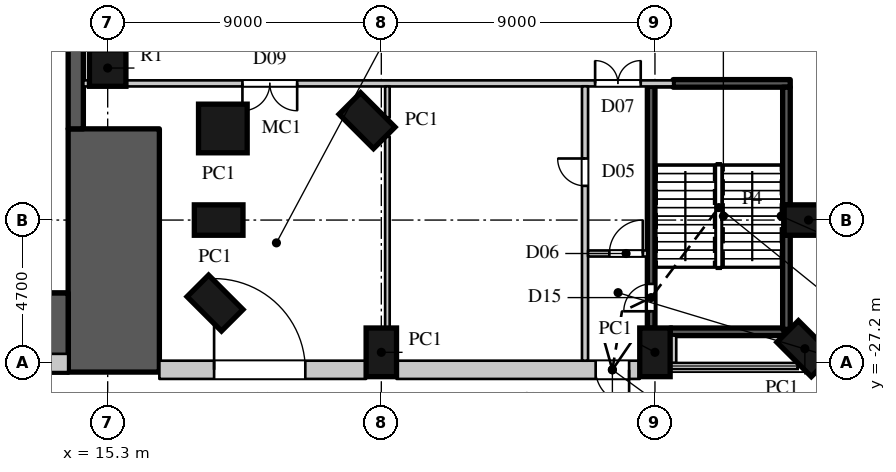
"""IFC4 building model, lengths in metres.
Left out: names, types, materials, properties, quantities, classifications, styles, units other than length and angle.
Written with IfcOpenShell. Run it as: python <this file> out.ifc"""

import sys

from ifc_helpers import new_model, si_unit, direction, frame, frame_2d, origin, origin_2d, place, context, subcontext, project, spatial, polyline, rectangle, circle, outline, extrude, element, fill, save


model = new_model("IFC4")
c1 = context("Model", 3, precision=1e-05, world=origin(), true_north=direction((0.0, 1.0)))
c2 = subcontext(c1, "Body", "Model", "MODEL_VIEW")
j1 = project(units=[si_unit("LENGTHUNIT", "METRE"), si_unit("PLANEANGLEUNIT", "RADIAN")], contexts=[c1])
p1 = place(None, origin())
s1 = spatial("IfcSite", under=j1, at=p1, CompositionType="ELEMENT")
p2 = place(p1, origin())
s2 = spatial("IfcBuilding", under=s1, at=p2, CompositionType="ELEMENT")
p3 = place(p2, origin())
s3 = spatial("IfcBuildingStorey", under=s2, at=p3, CompositionType="ELEMENT", Elevation=0.0)
p4 = place(p3, frame((15.5, -27.5, 0.0), z_axis=(0.0, 0.0, 1.0), x_axis=(0.0, 1.0, 0.0)))
e1 = element("IfcWall", 1, at=p4, inside=s3, PredefinedType="SOLIDWALL", context=c2, shape_type="SweptSolid", body=[
    extrude(rectangle(XDim=8.0, YDim=3.0, at=frame_2d((4.0, 0.0))), origin(), (0.0, 0.0, 1.0), 9.0),
])
p5 = place(p3, frame((14.25, -19.5, 0.0), z_axis=(0.0, 0.0, 1.0), x_axis=(0.0, 1.0, 0.0)))
e2 = element("IfcWall", 2, at=p5, inside=s3, PredefinedType="SOLIDWALL", context=c2, shape_type="SweptSolid", body=[
    extrude(rectangle(XDim=39.0, YDim=0.5, at=frame_2d((19.5, 0.0))), origin(), (0.0, 0.0, 1.0), 9.0),
])
p6 = place(p3, frame((-10.0, -27.2, 0.0), z_axis=(0.0, 0.0, 1.0), x_axis=(1.0, 0.0, 0.0)))
e3 = element("IfcWall", 3, at=p6, inside=s3, PredefinedType="SOLIDWALL", context=c2, shape_type="SweptSolid", body=[
    extrude(outline(polyline([(24.0, 11.553), (18.661, 23.543), (15.919, 22.326), (18.264, 24.131), (17.882, 24.696), (17.248, 25.422), (16.575, 26.079), (16.345, 26.278), (15.85, 26.664), (15.061, 27.167), (14.198, 27.573), (13.259, 27.854), (12.757, 27.94), (12.262, 27.983), (11.738, 27.983), (11.243, 27.94), (10.741, 27.854), (9.802, 27.573), (8.939, 27.167), (8.15, 26.664), (7.655, 26.278), (7.425, 26.079), (6.752, 25.422), (6.118, 24.696), (5.736, 24.131), (8.081, 22.326), (5.339, 23.543), (0.0, 11.553), (0.0, 28.6), (24.0, 28.6), (24.0, 11.553)])), frame((0.0, 0.3, 0.0), z_axis=(0.0, -1.0, 0.0), x_axis=(1.0, 0.0, 0.0)), (0.0, 0.0, 1.0), 0.6),
])
p7 = place(p3, frame((-10.0, -26.2, 0.0), z_axis=(0.0, 0.0, 1.0), x_axis=(1.0, 0.0, 0.0)))
e4 = element("IfcWall", 4, at=p7, inside=s3, PredefinedType="SOLIDWALL", context=c2, shape_type="SweptSolid", body=[
    extrude(outline(polyline([(24.0, 0.0), (23.5, 2.04), (23.0, 3.993), (22.5, 5.859), (22.0, 7.639), (21.5, 9.332), (21.023, 10.865), (21.26, 10.333), (24.0, 11.553), (24.0, 0.0)])), frame((0.0, 1.3, 0.0), z_axis=(0.0, -1.0, 0.0), x_axis=(1.0, 0.0, 0.0)), (0.0, 0.0, 1.0), 2.6),
])
for number, where, z_axis, x_axis in (
    (5, (18.831, -25.231, 0.0), (0.0, 0.0, 1.0), (0.707, 0.707, 0.0)),
    (6, (18.95, -22.5, 0.0), (0.0, 0.0, 1.0), (0.0, 1.0, 0.0)),
):
    element("IfcColumn", number, at=place(p3, frame(where, z_axis=z_axis, x_axis=x_axis)), inside=s3, PredefinedType="COLUMN", context=c2, shape_type="SweptSolid", body=[
        extrude(rectangle(XDim=1.0, YDim=1.6, at=origin_2d()), origin(), (0.0, 0.0, 1.0), 9.0),
    ])
p8 = place(p3, frame((19.088, -19.488, 0.0), z_axis=(0.0, 0.0, 1.0), x_axis=(1.0, 0.0, 0.0)))
e7 = element("IfcColumn", 7, at=p8, inside=s3, PredefinedType="COLUMN", context=c2, shape_type="SweptSolid", body=[
    extrude(circle(Radius=0.8, at=origin_2d()), origin(), (0.0, 0.0, 1.0), 9.0),
])
for number, where, z_axis, x_axis in (
    (8, (23.831, -19.231, 0.0), (0.0, 0.0, 1.0), (0.707, 0.707, 0.0)),
    (9, (24.3, -26.85, 0.0), (0.0, 0.0, 1.0), (1.0, 0.0, 0.0)),
    (10, (33.3, -26.85, 0.0), (0.0, 0.0, 1.0), (1.0, 0.0, 0.0)),
    (11, (38.231, -26.731, 0.0), (0.0, 0.0, 1.0), (0.707, 0.707, 0.0)),
    (12, (38.35, -22.5, 0.0), (0.0, 0.0, 1.0), (0.0, 1.0, 0.0)),
):
    element("IfcColumn", number, at=place(p3, frame(where, z_axis=z_axis, x_axis=x_axis)), inside=s3, PredefinedType="COLUMN", context=c2, shape_type="SweptSolid", body=[
        extrude(rectangle(XDim=1.0, YDim=1.6, at=origin_2d()), origin(), (0.0, 0.0, 1.0), 9.0),
    ])
p9 = place(p3, frame((15.3, -17.5, 0.0), z_axis=(0.0, 0.0, 1.0), x_axis=(1.0, 0.0, 0.0)))
e13 = element("IfcColumn", 13, at=p9, inside=s3, PredefinedType="COLUMN", context=c2, shape_type="SweptSolid", body=[
    extrude(circle(Radius=0.6, at=origin_2d()), origin(), (0.0, 0.0, 1.0), 9.0),
])
p10 = place(p3, frame((17.0, -27.425, 0.0), z_axis=(0.0, 0.0, 1.0), x_axis=(1.0, 0.0, 0.0)))
e14 = element("IfcWall", 14, at=p10, inside=s3, PredefinedType="ELEMENTEDWALL", context=c2, shape_type="SweptSolid", body=[
    extrude(rectangle(XDim=6.8, YDim=0.6, at=frame_2d((3.4, 0.0))), origin(), (0.0, 0.0, 1.0), 8.6),
])
p11 = place(p10, frame((1.8, 0.0, 0.0)))
e15 = element("IfcOpeningElement", 15, at=p11, cuts=e14, PredefinedType="OPENING", context=c2, shape_type="SweptSolid", body=[
    extrude(rectangle(XDim=3.0, YDim=3.6, at=frame_2d((1.5, 1.8))), frame((0.0, 0.31, 0.0), z_axis=(0.0, -1.0, 0.0), x_axis=(1.0, 0.0, 0.0)), (0.0, 0.0, 1.0), 0.62),
])
p12 = place(p3, frame((32.8, -27.425, 0.0), z_axis=(0.0, 0.0, 1.0), x_axis=(-1.0, 0.0, 0.0)))
e16 = element("IfcWall", 16, at=p12, inside=s3, PredefinedType="ELEMENTEDWALL", context=c2, shape_type="SweptSolid", body=[
    extrude(rectangle(XDim=8.0, YDim=0.6, at=frame_2d((4.0, 0.0))), origin(), (0.0, 0.0, 1.0), 8.6),
])
p13 = place(p12, frame((0.35, 0.0, 0.0)))
e17 = element("IfcOpeningElement", 17, at=p13, cuts=e16, PredefinedType="OPENING", context=c2, shape_type="SweptSolid", body=[
    extrude(rectangle(XDim=1.1, YDim=2.4, at=frame_2d((0.55, 1.2))), frame((0.0, 0.31, 0.0), z_axis=(0.0, -1.0, 0.0), x_axis=(1.0, 0.0, 0.0)), (0.0, 0.0, 1.0), 0.62),
])
p14 = place(p3, frame((14.5, -18.005, 0.0), z_axis=(0.0, 0.0, 1.0), x_axis=(1.0, 0.0, 0.0)))
e18 = element("IfcWall", 18, at=p14, inside=s3, PredefinedType="PARTITIONING", context=c2, shape_type="SweptSolid", body=[
    extrude(rectangle(XDim=0.368, YDim=0.2, at=frame_2d((0.184, 0.0))), origin(), (0.0, 0.0, 1.0), 8.598),
])
p15 = place(p3, frame((15.732, -18.005, 0.0), z_axis=(0.0, 0.0, 1.0), x_axis=(1.0, 0.0, 0.0)))
e19 = element("IfcWall", 19, at=p15, inside=s3, PredefinedType="PARTITIONING", context=c2, shape_type="SweptSolid", body=[
    extrude(rectangle(XDim=18.167, YDim=0.2, at=frame_2d((9.083, 0.0))), origin(), (0.0, 0.0, 1.0), 8.598),
])
p16 = place(p15, frame((15.6, 0.0, 0.0)))
e20 = element("IfcOpeningElement", 20, at=p16, cuts=e19, PredefinedType="OPENING", context=c2, shape_type="SweptSolid", body=[
    extrude(rectangle(XDim=1.5, YDim=2.4, at=frame_2d((0.75, 1.2))), frame((0.0, 0.11, 0.0), z_axis=(0.0, -1.0, 0.0), x_axis=(1.0, 0.0, 0.0)), (0.0, 0.0, 1.0), 0.22),
])
p17 = place(p15, frame((4.0, 0.0, 0.0)))
e21 = element("IfcOpeningElement", 21, at=p17, cuts=e19, PredefinedType="OPENING", context=c2, shape_type="SweptSolid", body=[
    extrude(rectangle(XDim=1.8, YDim=2.4, at=frame_2d((0.9, 1.2))), frame((0.0, 0.11, 0.0), z_axis=(0.0, -1.0, 0.0), x_axis=(1.0, 0.0, 0.0)), (0.0, 0.0, 1.0), 0.22),
])
p18 = place(p3, frame((31.0, -27.125, 0.0), z_axis=(0.0, 0.0, 1.0), x_axis=(0.0, 1.0, 0.0)))
e22 = element("IfcWall", 22, at=p18, inside=s3, PredefinedType="PARTITIONING", context=c2, shape_type="SweptSolid", body=[
    extrude(rectangle(XDim=9.025, YDim=0.2, at=frame_2d((4.512, 0.0))), origin(), (0.0, 0.0, 1.0), 8.598),
])
p19 = place(p18, frame((5.75, 0.0, 0.0)))
e23 = element("IfcOpeningElement", 23, at=p19, cuts=e22, PredefinedType="OPENING", context=c2, shape_type="SweptSolid", body=[
    extrude(rectangle(XDim=0.9, YDim=2.2, at=frame_2d((0.45, 1.1))), frame((0.0, 0.11, 0.0), z_axis=(0.0, -1.0, 0.0), x_axis=(1.0, 0.0, 0.0)), (0.0, 0.0, 1.0), 0.22),
])
p20 = place(p3, frame((31.1, -23.6, 0.0), z_axis=(0.0, 0.0, 1.0), x_axis=(1.0, 0.0, 0.0)))
e24 = element("IfcWall", 24, at=p20, inside=s3, PredefinedType="PARTITIONING", context=c2, shape_type="SweptSolid", body=[
    extrude(rectangle(XDim=1.95, YDim=0.2, at=frame_2d((0.975, 0.0))), origin(), (0.0, 0.0, 1.0), 8.598),
])
p21 = place(p20, frame((0.7, 0.0, 0.0)))
e25 = element("IfcOpeningElement", 25, at=p21, cuts=e24, PredefinedType="OPENING", context=c2, shape_type="SweptSolid", body=[
    extrude(rectangle(XDim=1.1, YDim=2.2, at=frame_2d((0.55, 1.1))), frame((0.0, 0.11, 0.0), z_axis=(0.0, -1.0, 0.0), x_axis=(1.0, 0.0, 0.0)), (0.0, 0.0, 1.0), 0.22),
])
p22 = place(p3, frame((33.9, -27.2, 0.0), z_axis=(0.0, 0.0, 1.0), x_axis=(0.0, 1.0, 0.0)))
e26 = element("IfcWall", 26, at=p22, inside=s3, PredefinedType="PARTITIONING", context=c2, shape_type="SweptSolid", body=[
    extrude(rectangle(XDim=0.9, YDim=0.2, at=frame_2d((0.45, 0.0))), origin(), (0.0, 0.0, 1.0), 8.598),
])
p23 = place(p3, frame((24.5, -26.05, 0.0), z_axis=(0.0, 0.0, 1.0), x_axis=(0.0, 1.0, 0.0)))
e27 = element("IfcWall", 27, at=p23, inside=s3, PredefinedType="PARTITIONING", context=c2, shape_type="SweptSolid", body=[
    extrude(rectangle(XDim=6.297, YDim=0.15, at=frame_2d((3.148, 0.0))), origin(), (0.0, 0.0, 1.0), 8.598),
])
p24 = place(p3, frame((24.5, -19.133, 0.0), z_axis=(0.0, 0.0, 1.0), x_axis=(0.0, 1.0, 0.0)))
e28 = element("IfcWall", 28, at=p24, inside=s3, PredefinedType="PARTITIONING", context=c2, shape_type="SweptSolid", body=[
    extrude(rectangle(XDim=1.033, YDim=0.15, at=frame_2d((0.516, 0.0))), origin(), (0.0, 0.0, 1.0), 8.598),
])
p25 = place(p3, frame((33.175, -26.05, 0.0), z_axis=(0.0, 0.0, 1.0), x_axis=(0.0, 1.0, 0.0)))
e29 = element("IfcWall", 29, at=p25, inside=s3, PredefinedType="SHEAR", context=c2, shape_type="SweptSolid", body=[
    extrude(rectangle(XDim=7.945, YDim=0.25, at=frame_2d((3.973, 0.0))), origin(), (0.0, 0.0, 1.0), 8.6),
])
p26 = place(p25, frame((0.55, 0.0, 0.0)))
e30 = element("IfcOpeningElement", 30, at=p26, cuts=e29, PredefinedType="OPENING", context=c2, shape_type="SweptSolid", body=[
    extrude(rectangle(XDim=0.9, YDim=2.2, at=frame_2d((0.45, 1.1))), frame((0.0, 0.135, 0.0), z_axis=(0.0, -1.0, 0.0), x_axis=(1.0, 0.0, 0.0)), (0.0, 0.0, 1.0), 0.27),
])
p27 = place(p3, frame((33.8, -26.175, 0.0), z_axis=(0.0, 0.0, 1.0), x_axis=(1.0, 0.0, 0.0)))
e31 = element("IfcWall", 31, at=p27, inside=s3, PredefinedType="SHEAR", context=c2, shape_type="SweptSolid", body=[
    extrude(rectangle(XDim=3.745, YDim=0.25, at=frame_2d((1.873, 0.0))), origin(), (0.0, 0.0, 1.0), 8.6),
])
p28 = place(p3, frame((33.899, -18.005, 0.0), z_axis=(0.0, 0.0, 1.0), x_axis=(1.0, 0.0, 0.0)))
e32 = element("IfcWall", 32, at=p28, inside=s3, PredefinedType="SHEAR", context=c2, shape_type="SweptSolid", body=[
    extrude(rectangle(XDim=3.851, YDim=0.25, at=frame_2d((1.926, 0.0))), origin(), (0.0, 0.0, 1.0), 8.6),
])
p29 = place(p3, frame((37.625, -26.095, 0.0), z_axis=(0.0, 0.0, 1.0), x_axis=(0.0, 1.0, 0.0)))
e33 = element("IfcWall", 33, at=p29, inside=s3, PredefinedType="SHEAR", context=c2, shape_type="SweptSolid", body=[
    extrude(rectangle(XDim=3.095, YDim=0.25, at=frame_2d((1.548, 0.0))), origin(), (0.0, 0.0, 1.0), 8.6),
])
p30 = place(p3, frame((37.625, -22.0, 0.0), z_axis=(0.0, 0.0, 1.0), x_axis=(0.0, 1.0, 0.0)))
e34 = element("IfcWall", 34, at=p30, inside=s3, PredefinedType="SHEAR", context=c2, shape_type="SweptSolid", body=[
    extrude(rectangle(XDim=3.87, YDim=0.25, at=frame_2d((1.935, 0.0))), origin(), (0.0, 0.0, 1.0), 8.6),
])
p31 = place(p11, origin())
e35 = element("IfcDoor", 35, at=p31, inside=s3, OperationType="ROLLINGUP", PredefinedType="DOOR", context=c2, shape_type="SweptSolid", body=[
    extrude(rectangle(XDim=3.0, YDim=3.6, at=frame_2d((1.5, 1.8))), frame((0.0, -0.05, 0.0), z_axis=(0.0, -1.0, 0.0), x_axis=(1.0, 0.0, 0.0)), (0.0, 0.0, 1.0), 0.05),
])
fill(e15, e35)
p32 = place(p13, origin())
e36 = element("IfcDoor", 36, at=p32, inside=s3, OperationType="SINGLE_SWING_LEFT", PredefinedType="DOOR", context=c2, shape_type="SweptSolid", body=[
    extrude(rectangle(XDim=1.1, YDim=2.4, at=frame_2d((0.55, 1.2))), frame((0.0, -0.05, 0.0), z_axis=(0.0, -1.0, 0.0), x_axis=(1.0, 0.0, 0.0)), (0.0, 0.0, 1.0), 0.05),
])
fill(e17, e36)
p33 = place(p16, origin())
e37 = element("IfcDoor", 37, at=p33, inside=s3, OperationType="DOUBLE_DOOR_SINGLE_SWING", PredefinedType="DOOR", context=c2, shape_type="SweptSolid", body=[
    extrude(rectangle(XDim=1.5, YDim=2.4, at=frame_2d((0.75, 1.2))), frame((0.0, 0.025, 0.0), z_axis=(0.0, -1.0, 0.0), x_axis=(1.0, 0.0, 0.0)), (0.0, 0.0, 1.0), 0.05),
])
fill(e20, e37)
p34 = place(p21, origin())
e38 = element("IfcDoor", 38, at=p34, inside=s3, OperationType="SINGLE_SWING_RIGHT", PredefinedType="DOOR", context=c2, shape_type="SweptSolid", body=[
    extrude(rectangle(XDim=1.1, YDim=2.2, at=frame_2d((0.55, 1.1))), frame((0.0, 0.025, 0.0), z_axis=(0.0, -1.0, 0.0), x_axis=(1.0, 0.0, 0.0)), (0.0, 0.0, 1.0), 0.05),
])
fill(e25, e38)
p35 = place(p17, origin())
e39 = element("IfcDoor", 39, at=p35, inside=s3, OperationType="DOUBLE_DOOR_SINGLE_SWING", PredefinedType="DOOR", context=c2, shape_type="SweptSolid", body=[
    extrude(rectangle(XDim=1.8, YDim=2.4, at=frame_2d((0.9, 1.2))), frame((0.0, 0.025, 0.0), z_axis=(0.0, -1.0, 0.0), x_axis=(1.0, 0.0, 0.0)), (0.0, 0.0, 1.0), 0.05),
])
fill(e21, e39)
p36 = place(p19, origin())
e40 = element("IfcDoor", 40, at=p36, inside=s3, OperationType="SINGLE_SWING_RIGHT", PredefinedType="DOOR", context=c2, shape_type="SweptSolid", body=[
    extrude(rectangle(XDim=0.9, YDim=2.2, at=frame_2d((0.45, 1.1))), frame((0.0, 0.025, 0.0), z_axis=(0.0, -1.0, 0.0), x_axis=(1.0, 0.0, 0.0)), (0.0, 0.0, 1.0), 0.05),
])
fill(e23, e40)
p37 = place(p26, origin())
e41 = element("IfcDoor", 41, at=p37, inside=s3, OperationType="SINGLE_SWING_LEFT", PredefinedType="DOOR", context=c2, shape_type="SweptSolid", body=[
    extrude(rectangle(XDim=0.9, YDim=2.2, at=frame_2d((0.45, 1.1))), frame((0.0, 0.025, 0.0), z_axis=(0.0, -1.0, 0.0), x_axis=(1.0, 0.0, 0.0)), (0.0, 0.0, 1.0), 0.05),
])
fill(e30, e41)
save(model, sys.argv[1])
